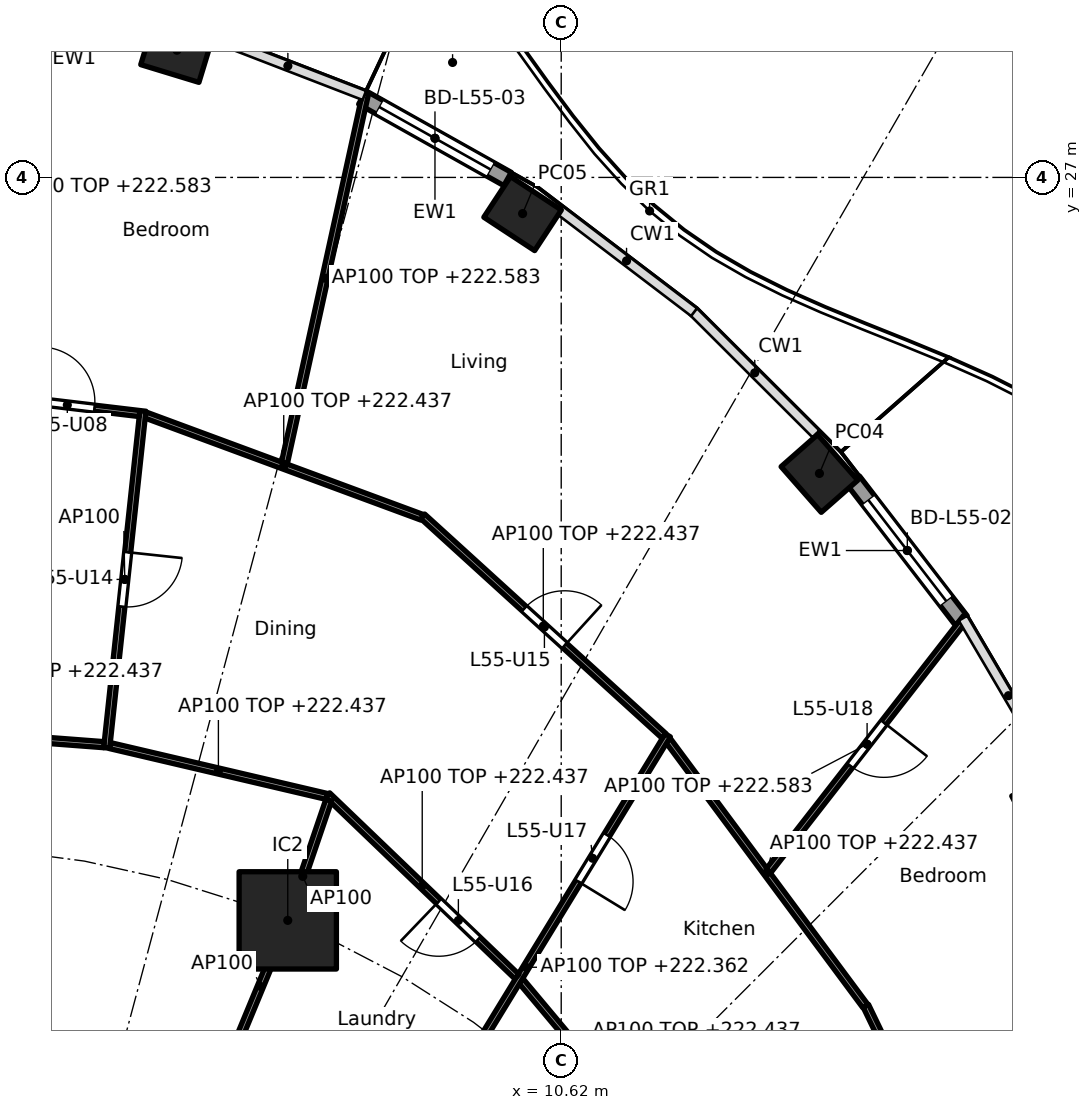
"""IFC4 building model, lengths in metres.
Left out: names, types, materials, properties, quantities, classifications, styles, units other than length and angle.
Written with IfcOpenShell. Run it as: python <this file> out.ifc"""

import sys

from ifc_helpers import new_model, si_unit, direction, frame, frame_2d, origin, origin_2d, place, context, subcontext, project, spatial, rectangle, hollow_rectangle, extrude, element, fill, save


model = new_model("IFC4")
c1 = context("Model", 3, precision=1e-05, world=origin(), true_north=direction((0.0, 1.0)))
c2 = subcontext(c1, "Body", "Model", "MODEL_VIEW")
j1 = project(units=[si_unit("LENGTHUNIT", "METRE"), si_unit("PLANEANGLEUNIT", "RADIAN")], contexts=[c1])
p1 = place(None, origin())
s1 = spatial("IfcSite", under=j1, at=p1, CompositionType="ELEMENT")
p2 = place(p1, origin())
s2 = spatial("IfcBuilding", under=s1, at=p2, CompositionType="ELEMENT")
p3 = place(p2, frame((0.0, 0.0, 219.6)))
s3 = spatial("IfcBuildingStorey", under=s2, at=p3, CompositionType="ELEMENT", Elevation=219.6)
for number, where, z_axis, x_axis in (
    (1, (18.612, 16.563, 0.0), (0.0, 0.0, 1.0), (-0.452, 0.892, 0.0)),
    (2, (14.866, 22.132, 0.0), (0.0, 0.0, 1.0), (-0.66, 0.751, 0.0)),
    (3, (9.985, 26.405, 0.0), (0.0, 0.0, 1.0), (-0.836, 0.549, 0.0)),
    (4, (4.3, 29.092, 0.0), (0.0, 0.0, 1.0), (-0.957, 0.292, 0.0)),
):
    element("IfcColumn", number, at=place(p3, frame(where, z_axis=z_axis, x_axis=x_axis)), inside=s3, PredefinedType="COLUMN", context=c2, shape_type="SweptSolid", body=[
        extrude(hollow_rectangle(XDim=1.0, YDim=0.8, WallThickness=0.032, at=origin_2d()), origin(), (0.0, 0.0, 1.0), 3.7),
    ])
p4 = place(p3, frame((6.123, 14.782, 0.0), z_axis=(0.0, 0.0, 1.0), x_axis=(1.0, 0.0, 0.0)))
e5 = element("IfcColumn", 5, at=p4, inside=s3, PredefinedType="COLUMN", context=c2, shape_type="SweptSolid", body=[
    extrude(rectangle(XDim=1.6, YDim=1.6, at=origin_2d()), origin(), (0.0, 0.0, 1.0), 3.7),
])
p5 = place(p3, frame((15.426, 22.013, 0.0), z_axis=(0.0, 0.0, 1.0), x_axis=(0.610438565676, -0.792063607001, 0.0)))
e6 = element("IfcWall", 6, at=p5, inside=s3, PredefinedType="SOLIDWALL", context=c2, shape_type="SweptSolid", body=[
    extrude(rectangle(XDim=2.901, YDim=0.25, at=frame_2d((1.45, 0.0))), origin(), (0.0, 0.0, 1.0), 3.44),
])
p6 = place(p5, frame((0.4, 0.0, 0.0)))
e7 = element("IfcOpeningElement", 7, at=p6, cuts=e6, PredefinedType="OPENING", context=c2, shape_type="SweptSolid", body=[
    extrude(rectangle(XDim=2.1, YDim=2.4, at=frame_2d((1.05, 1.2))), frame((0.0, 0.135, 0.0), z_axis=(0.0, -1.0, 0.0), x_axis=(1.0, 0.0, 0.0)), (0.0, 0.0, 1.0), 0.27),
])
p7 = place(p3, frame((7.35, 28.314, 0.0), z_axis=(0.0, 0.0, 1.0), x_axis=(0.872079929129, -0.489363461254, 0.0)))
e8 = element("IfcWall", 8, at=p7, inside=s3, PredefinedType="SOLIDWALL", context=c2, shape_type="SweptSolid", body=[
    extrude(rectangle(XDim=2.738, YDim=0.25, at=frame_2d((1.369, 0.0))), origin(), (0.0, 0.0, 1.0), 3.44),
])
p8 = place(p7, frame((0.319, 0.0, 0.0)))
e9 = element("IfcOpeningElement", 9, at=p8, cuts=e8, PredefinedType="OPENING", context=c2, shape_type="SweptSolid", body=[
    extrude(rectangle(XDim=2.1, YDim=2.4, at=frame_2d((1.05, 1.2))), frame((0.0, 0.135, 0.0), z_axis=(0.0, -1.0, 0.0), x_axis=(1.0, 0.0, 0.0)), (0.0, 0.0, 1.0), 0.27),
])
p9 = place(p3, frame((18.095, 8.269, 0.0), z_axis=(0.0, 0.0, 1.0), x_axis=(-0.434640773561, 0.900603907363, 0.0)))
e10 = element("IfcWall", 10, at=p9, inside=s3, PredefinedType="PARTITIONING", context=c2, shape_type="SweptSolid", body=[
    extrude(rectangle(XDim=5.674, YDim=0.1, at=frame_2d((2.837, 0.0))), origin(), (0.0, 0.0, 1.0), 2.837),
])
p10 = place(p3, frame((12.759, 10.443, 0.0), z_axis=(0.0, 0.0, 1.0), x_axis=(-0.642225196965, 0.766516011825, 0.0)))
e11 = element("IfcWall", 11, at=p10, inside=s3, PredefinedType="PARTITIONING", context=c2, shape_type="SweptSolid", body=[
    extrude(rectangle(XDim=4.361, YDim=0.1, at=frame_2d((2.18, 0.0))), origin(), (0.0, 0.0, 1.0), 2.837),
])
p11 = place(p3, frame((15.621, 13.374, 0.0), z_axis=(0.0, 0.0, 1.0), x_axis=(-0.596174489482, 0.8028548923, 0.0)))
e12 = element("IfcWall", 12, at=p11, inside=s3, PredefinedType="PARTITIONING", context=c2, shape_type="SweptSolid", body=[
    extrude(rectangle(XDim=5.442, YDim=0.1, at=frame_2d((2.721, 0.0))), origin(), (0.0, 0.0, 1.0), 2.837),
])
p12 = place(p3, frame((14.029, 15.598, 0.0), z_axis=(0.0, 0.0, 1.0), x_axis=(0.614558710688, 0.788871086501, 0.0)))
e13 = element("IfcWall", 13, at=p12, inside=s3, PredefinedType="PARTITIONING", context=c2, shape_type="SweptSolid", body=[
    extrude(rectangle(XDim=5.276, YDim=0.1, at=frame_2d((2.638, 0.0))), origin(), (0.0, 0.0, 1.0), 2.983),
])
p13 = place(p12, frame((2.188, 0.0, 0.0)))
e14 = element("IfcOpeningElement", 14, at=p13, cuts=e13, PredefinedType="OPENING", context=c2, shape_type="SweptSolid", body=[
    extrude(rectangle(XDim=0.9, YDim=2.1, at=frame_2d((0.45, 1.05))), frame((0.0, 0.06, 0.0), z_axis=(0.0, -1.0, 0.0), x_axis=(1.0, 0.0, 0.0)), (0.0, 0.0, 1.0), 0.12),
])
p14 = place(p3, frame((7.71, 10.197, 0.0), z_axis=(0.0, 0.0, 1.0), x_axis=(0.521477621335, 0.853264959111, 0.0)))
e15 = element("IfcWall", 15, at=p14, inside=s3, PredefinedType="PARTITIONING", context=c2, shape_type="SweptSolid", body=[
    extrude(rectangle(XDim=8.941, YDim=0.1, at=frame_2d((4.471, 0.0))), origin(), (0.0, 0.0, 1.0), 2.762),
])
p15 = place(p14, frame((6.121, 0.0, 0.0)))
e16 = element("IfcOpeningElement", 16, at=p15, cuts=e15, PredefinedType="OPENING", context=c2, shape_type="SweptSolid", body=[
    extrude(rectangle(XDim=0.9, YDim=2.1, at=frame_2d((0.45, 1.05))), frame((0.0, 0.06, 0.0), z_axis=(0.0, -1.0, 0.0), x_axis=(1.0, 0.0, 0.0)), (0.0, 0.0, 1.0), 0.12),
])
p16 = place(p3, frame((9.89, 13.858, 0.0), z_axis=(0.0, 0.0, 1.0), x_axis=(-0.72167233993, 0.692234811159, 0.0)))
e17 = element("IfcWall", 17, at=p16, inside=s3, PredefinedType="PARTITIONING", context=c2, shape_type="SweptSolid", body=[
    extrude(rectangle(XDim=4.313, YDim=0.1, at=frame_2d((2.156, 0.0))), origin(), (0.0, 0.0, 1.0), 2.837),
])
p17 = place(p16, frame((0.883, 0.0, 0.0)))
e18 = element("IfcOpeningElement", 18, at=p17, cuts=e17, PredefinedType="OPENING", context=c2, shape_type="SweptSolid", body=[
    extrude(rectangle(XDim=0.9, YDim=2.1, at=frame_2d((0.45, 1.05))), frame((0.0, 0.06, 0.0), z_axis=(0.0, -1.0, 0.0), x_axis=(1.0, 0.0, 0.0)), (0.0, 0.0, 1.0), 0.12),
])
p18 = place(p3, frame((12.31, 17.817, 0.0), z_axis=(0.0, 0.0, 1.0), x_axis=(-0.739697052892, 0.672940019573, 0.0)))
e19 = element("IfcWall", 19, at=p18, inside=s3, PredefinedType="PARTITIONING", context=c2, shape_type="SweptSolid", body=[
    extrude(rectangle(XDim=5.365, YDim=0.1, at=frame_2d((2.683, 0.0))), origin(), (0.0, 0.0, 1.0), 2.837),
])
p19 = place(p18, frame((2.208, 0.0, 0.0)))
e20 = element("IfcOpeningElement", 20, at=p19, cuts=e19, PredefinedType="OPENING", context=c2, shape_type="SweptSolid", body=[
    extrude(rectangle(XDim=0.9, YDim=2.1, at=frame_2d((0.45, 1.05))), frame((0.0, 0.06, 0.0), z_axis=(0.0, -1.0, 0.0), x_axis=(1.0, 0.0, 0.0)), (0.0, 0.0, 1.0), 0.12),
])
p20 = place(p3, frame((5.243, 12.657, 0.0), z_axis=(0.0, 0.0, 1.0), x_axis=(0.382719158442, 0.923864733477, 0.0)))
e21 = element("IfcWall", 21, at=p20, inside=s3, PredefinedType="PARTITIONING", context=c2, shape_type="SweptSolid", body=[
    extrude(rectangle(XDim=2.25, YDim=0.1, at=frame_2d((1.125, 0.0))), origin(), (0.0, 0.0, 1.0), 3.44),
])
p21 = place(p3, frame((6.139, 14.829, 0.0), z_axis=(0.0, 0.0, 1.0), x_axis=(0.32278593828, 0.946471995385, 0.0)))
e22 = element("IfcWall", 22, at=p21, inside=s3, PredefinedType="PARTITIONING", context=c2, shape_type="SweptSolid", body=[
    extrude(rectangle(XDim=2.042, YDim=0.1, at=frame_2d((1.021, 0.0))), origin(), (0.0, 0.0, 1.0), 3.44),
])
p22 = place(p3, frame((6.766, 16.82, 0.0), z_axis=(0.0, 0.0, 1.0), x_axis=(-0.973612608559, 0.22820711745, 0.0)))
e23 = element("IfcWall", 23, at=p22, inside=s3, PredefinedType="PARTITIONING", context=c2, shape_type="SweptSolid", body=[
    extrude(rectangle(XDim=3.663, YDim=0.1, at=frame_2d((1.832, 0.0))), origin(), (0.0, 0.0, 1.0), 2.837),
])
p23 = place(p3, frame((8.331, 21.411, 0.0), z_axis=(0.0, 0.0, 1.0), x_axis=(-0.937891982431, 0.346927412136, 0.0)))
e24 = element("IfcWall", 24, at=p23, inside=s3, PredefinedType="PARTITIONING", context=c2, shape_type="SweptSolid", body=[
    extrude(rectangle(XDim=4.85, YDim=0.1, at=frame_2d((2.425, 0.0))), origin(), (0.0, 0.0, 1.0), 2.837),
])
p24 = place(p3, frame((6.067, 22.301, 0.0), z_axis=(0.0, 0.0, 1.0), x_axis=(0.214401821533, 0.976745544614, 0.0)))
e25 = element("IfcWall", 25, at=p24, inside=s3, PredefinedType="PARTITIONING", context=c2, shape_type="SweptSolid", body=[
    extrude(rectangle(XDim=6.228, YDim=0.1, at=frame_2d((3.114, 0.0))), origin(), (0.0, 0.0, 1.0), 2.983),
])
p25 = place(p3, frame((3.145, 17.618, 0.0), z_axis=(0.0, 0.0, 1.0), x_axis=(0.106820754108, 0.994278294288, 0.0)))
e26 = element("IfcWall", 26, at=p25, inside=s3, PredefinedType="PARTITIONING", context=c2, shape_type="SweptSolid", body=[
    extrude(rectangle(XDim=5.574, YDim=0.1, at=frame_2d((2.787, 0.0))), origin(), (0.0, 0.0, 1.0), 3.44),
])
p26 = place(p25, frame((2.337, 0.0, 0.0)))
e27 = element("IfcOpeningElement", 27, at=p26, cuts=e26, PredefinedType="OPENING", context=c2, shape_type="SweptSolid", body=[
    extrude(rectangle(XDim=0.9, YDim=2.1, at=frame_2d((0.45, 1.05))), frame((0.0, 0.06, 0.0), z_axis=(0.0, -1.0, 0.0), x_axis=(1.0, 0.0, 0.0)), (0.0, 0.0, 1.0), 0.12),
])
p27 = place(p3, frame((3.101, 17.671, 0.0), z_axis=(0.0, 0.0, 1.0), x_axis=(-0.997133705575, 0.075659587668, 0.0)))
e28 = element("IfcWall", 28, at=p27, inside=s3, PredefinedType="PARTITIONING", context=c2, shape_type="SweptSolid", body=[
    extrude(rectangle(XDim=3.601, YDim=0.1, at=frame_2d((1.801, 0.0))), origin(), (0.0, 0.0, 1.0), 2.837),
])
p28 = place(p3, frame((3.686, 23.117, 0.0), z_axis=(0.0, 0.0, 1.0), x_axis=(-0.992965872314, 0.11840091393, 0.0)))
e29 = element("IfcWall", 29, at=p28, inside=s3, PredefinedType="PARTITIONING", context=c2, shape_type="SweptSolid", body=[
    extrude(rectangle(XDim=4.786, YDim=0.1, at=frame_2d((2.393, 0.0))), origin(), (0.0, 0.0, 1.0), 2.837),
])
p29 = place(p28, frame((0.746, 0.0, 0.0)))
e30 = element("IfcOpeningElement", 30, at=p29, cuts=e29, PredefinedType="OPENING", context=c2, shape_type="SweptSolid", body=[
    extrude(rectangle(XDim=0.9, YDim=2.1, at=frame_2d((0.45, 1.05))), frame((0.0, 0.06, 0.0), z_axis=(0.0, -1.0, 0.0), x_axis=(1.0, 0.0, 0.0)), (0.0, 0.0, 1.0), 0.12),
])
p30 = place(p6, origin())
e31 = element("IfcDoor", 31, at=p30, inside=s3, OperationType="SLIDING_TO_LEFT", PredefinedType="DOOR", context=c2, shape_type="SweptSolid", body=[
    extrude(rectangle(XDim=2.1, YDim=2.4, at=frame_2d((1.05, 1.2))), frame((0.0, 0.025, 0.0), z_axis=(0.0, -1.0, 0.0), x_axis=(1.0, 0.0, 0.0)), (0.0, 0.0, 1.0), 0.05),
])
fill(e7, e31)
p31 = place(p8, origin())
e32 = element("IfcDoor", 32, at=p31, inside=s3, OperationType="SLIDING_TO_LEFT", PredefinedType="DOOR", context=c2, shape_type="SweptSolid", body=[
    extrude(rectangle(XDim=2.1, YDim=2.4, at=frame_2d((1.05, 1.2))), frame((0.0, 0.025, 0.0), z_axis=(0.0, -1.0, 0.0), x_axis=(1.0, 0.0, 0.0)), (0.0, 0.0, 1.0), 0.05),
])
fill(e9, e32)
p32 = place(p29, frame((0.9, 0.0, 0.0), x_axis=(-1.0, 0.0, 0.0)))
e33 = element("IfcDoor", 33, at=p32, inside=s3, OperationType="SINGLE_SWING_LEFT", PredefinedType="DOOR", context=c2, shape_type="SweptSolid", body=[
    extrude(rectangle(XDim=0.9, YDim=2.1, at=frame_2d((0.45, 1.05))), frame((0.0, 0.025, 0.0), z_axis=(0.0, -1.0, 0.0), x_axis=(1.0, 0.0, 0.0)), (0.0, 0.0, 1.0), 0.05),
])
fill(e30, e33)
p33 = place(p26, frame((0.9, 0.0, 0.0), x_axis=(-1.0, 0.0, 0.0)))
e34 = element("IfcDoor", 34, at=p33, inside=s3, OperationType="SINGLE_SWING_LEFT", PredefinedType="DOOR", context=c2, shape_type="SweptSolid", body=[
    extrude(rectangle(XDim=0.9, YDim=2.1, at=frame_2d((0.45, 1.05))), frame((0.0, 0.025, 0.0), z_axis=(0.0, -1.0, 0.0), x_axis=(1.0, 0.0, 0.0)), (0.0, 0.0, 1.0), 0.05),
])
fill(e27, e34)
p34 = place(p19, frame((0.9, 0.0, 0.0), x_axis=(-1.0, 0.0, 0.0)))
e35 = element("IfcDoor", 35, at=p34, inside=s3, OperationType="SINGLE_SWING_RIGHT", PredefinedType="DOOR", context=c2, shape_type="SweptSolid", body=[
    extrude(rectangle(XDim=0.9, YDim=2.1, at=frame_2d((0.45, 1.05))), frame((0.0, 0.025, 0.0), z_axis=(0.0, -1.0, 0.0), x_axis=(1.0, 0.0, 0.0)), (0.0, 0.0, 1.0), 0.05),
])
fill(e20, e35)
p35 = place(p17, origin())
e36 = element("IfcDoor", 36, at=p35, inside=s3, OperationType="SINGLE_SWING_RIGHT", PredefinedType="DOOR", context=c2, shape_type="SweptSolid", body=[
    extrude(rectangle(XDim=0.9, YDim=2.1, at=frame_2d((0.45, 1.05))), frame((0.0, 0.025, 0.0), z_axis=(0.0, -1.0, 0.0), x_axis=(1.0, 0.0, 0.0)), (0.0, 0.0, 1.0), 0.05),
])
fill(e18, e36)
p36 = place(p15, frame((0.9, 0.0, 0.0), x_axis=(-1.0, 0.0, 0.0)))
e37 = element("IfcDoor", 37, at=p36, inside=s3, OperationType="SINGLE_SWING_RIGHT", PredefinedType="DOOR", context=c2, shape_type="SweptSolid", body=[
    extrude(rectangle(XDim=0.9, YDim=2.1, at=frame_2d((0.45, 1.05))), frame((0.0, 0.025, 0.0), z_axis=(0.0, -1.0, 0.0), x_axis=(1.0, 0.0, 0.0)), (0.0, 0.0, 1.0), 0.05),
])
fill(e16, e37)
p37 = place(p13, frame((0.9, 0.0, 0.0), x_axis=(-1.0, 0.0, 0.0)))
e38 = element("IfcDoor", 38, at=p37, inside=s3, OperationType="SINGLE_SWING_LEFT", PredefinedType="DOOR", context=c2, shape_type="SweptSolid", body=[
    extrude(rectangle(XDim=0.9, YDim=2.1, at=frame_2d((0.45, 1.05))), frame((0.0, 0.025, 0.0), z_axis=(0.0, -1.0, 0.0), x_axis=(1.0, 0.0, 0.0)), (0.0, 0.0, 1.0), 0.05),
])
fill(e14, e38)
save(model, sys.argv[1])
